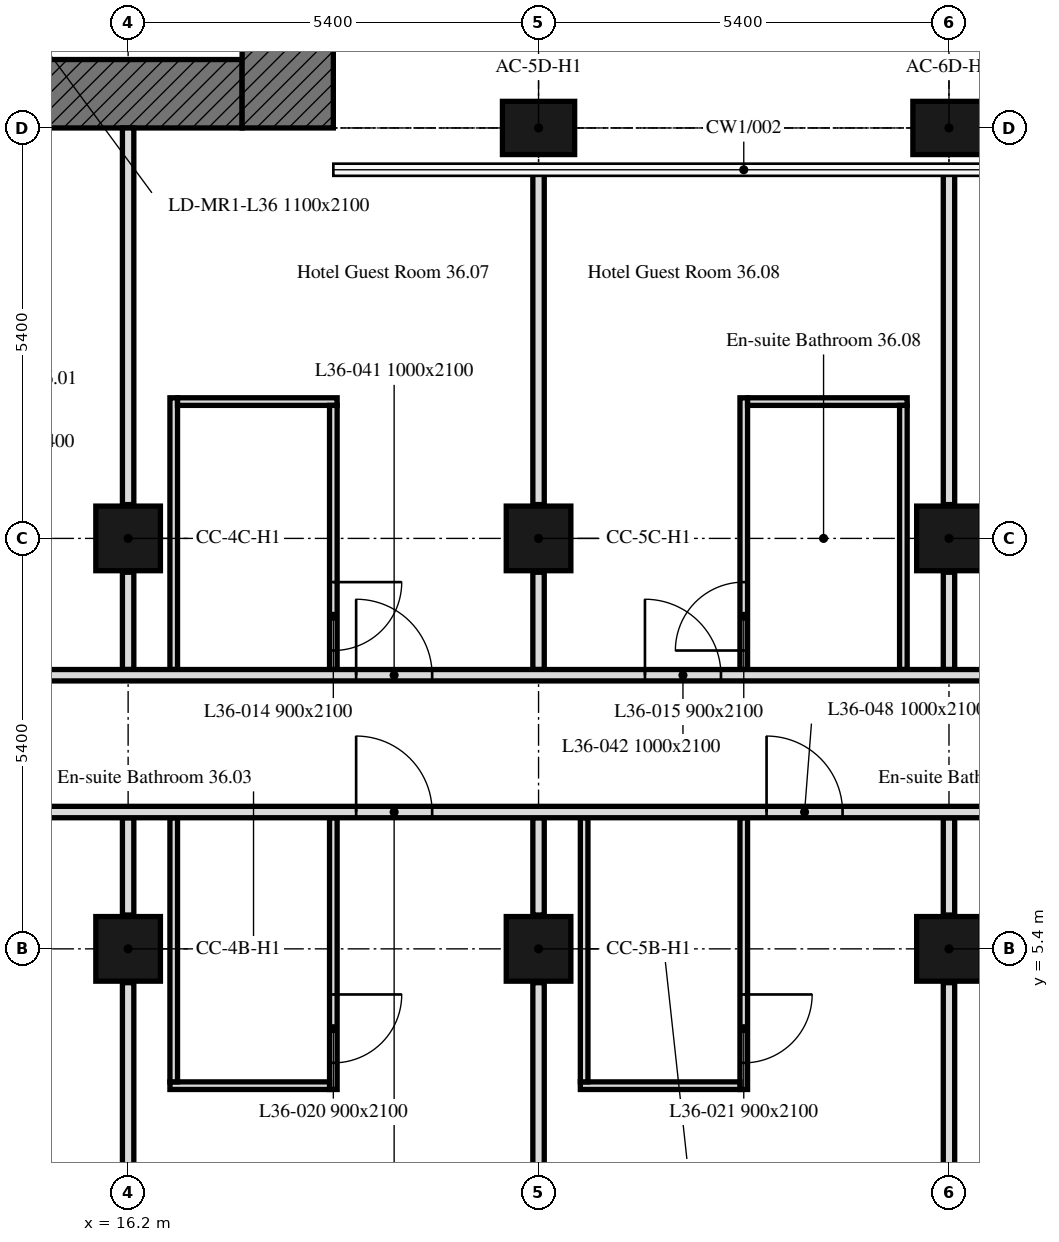
"""IFC4 building model, lengths in metres.
Left out: names, types, materials, properties, quantities, classifications, styles, units other than length and angle.
Written with IfcOpenShell. Run it as: python <this file> out.ifc"""

import sys

from ifc_helpers import new_model, si_unit, direction, frame, frame_2d, origin, origin_2d, place, context, subcontext, project, spatial, rectangle, extrude, element, fill, save


model = new_model("IFC4")
c1 = context("Model", 3, precision=1e-05, world=origin(), true_north=direction((0.0, 1.0)))
c2 = subcontext(c1, "Body", "Model", "MODEL_VIEW")
j1 = project(units=[si_unit("LENGTHUNIT", "METRE"), si_unit("PLANEANGLEUNIT", "RADIAN")], contexts=[c1])
p1 = place(None, origin())
s1 = spatial("IfcSite", under=j1, at=p1, CompositionType="ELEMENT")
p2 = place(p1, origin())
s2 = spatial("IfcBuilding", under=s1, at=p2, CompositionType="ELEMENT")
p3 = place(p2, frame((0.0, 0.0, 156.1)))
s3 = spatial("IfcBuildingStorey", under=s2, at=p3, CompositionType="ELEMENT", Elevation=156.1)
for number, where, z_axis, x_axis in (
    (1, (16.2, 5.4, 0.0), (0.0, 0.0, 1.0), (1.0, 0.0, 0.0)),
    (2, (21.6, 5.4, 0.0), (0.0, 0.0, 1.0), (1.0, 0.0, 0.0)),
    (3, (27.0, 5.4, 0.0), (0.0, 0.0, 1.0), (1.0, 0.0, 0.0)),
    (4, (16.2, 10.8, 0.0), (0.0, 0.0, 1.0), (1.0, 0.0, 0.0)),
    (5, (21.6, 10.8, 0.0), (0.0, 0.0, 1.0), (1.0, 0.0, 0.0)),
    (6, (27.0, 10.8, 0.0), (0.0, 0.0, 1.0), (1.0, 0.0, 0.0)),
):
    element("IfcColumn", number, at=place(p3, frame(where, z_axis=z_axis, x_axis=x_axis)), inside=s3, PredefinedType="COLUMN", context=c2, shape_type="SweptSolid", body=[
        extrude(rectangle(XDim=0.85, YDim=0.85, at=origin_2d()), origin(), (0.0, 0.0, 1.0), 3.0),
    ])
for number, where, z_axis, x_axis in (
    (7, (21.6, 16.2, 0.0), (0.0, 0.0, 1.0), (1.0, 0.0, 0.0)),
    (8, (27.0, 16.2, 0.0), (0.0, 0.0, 1.0), (1.0, 0.0, 0.0)),
):
    element("IfcColumn", number, at=place(p3, frame(where, z_axis=z_axis, x_axis=x_axis)), inside=s3, PredefinedType="COLUMN", context=c2, shape_type="SweptSolid", body=[
        extrude(rectangle(XDim=0.95, YDim=0.7, at=origin_2d()), origin(), (0.0, 0.0, 1.0), 3.0),
    ])
p4 = place(p3, frame((17.7, 16.65, 0.0), z_axis=(0.0, 0.0, 1.0), x_axis=(-1.0, 0.0, 0.0)))
e9 = element("IfcWall", 9, at=p4, inside=s3, PredefinedType="SOLIDWALL", context=c2, shape_type="SweptSolid", body=[
    extrude(rectangle(XDim=11.1, YDim=0.9, at=frame_2d((5.55, 0.0))), origin(), (0.0, 0.0, 1.0), 3.0),
])
p5 = place(p4, frame((5.55, 0.0, 0.0)))
e10 = element("IfcOpeningElement", 10, at=p5, cuts=e9, PredefinedType="OPENING", context=c2, shape_type="SweptSolid", body=[
    extrude(rectangle(XDim=2.0, YDim=2.4, at=frame_2d((1.0, 1.2))), frame((0.0, 0.45, 0.0), z_axis=(0.0, -1.0, 0.0), x_axis=(1.0, 0.0, 0.0)), (0.0, 0.0, 1.0), 0.9),
])
p6 = place(p3, frame((18.3, 32.4, 0.0), z_axis=(0.0, 0.0, 1.0), x_axis=(0.0, -1.0, 0.0)))
e11 = element("IfcWall", 11, at=p6, inside=s3, PredefinedType="SOLIDWALL", context=c2, shape_type="SweptSolid", body=[
    extrude(rectangle(XDim=16.2, YDim=1.2, at=frame_2d((8.1, 0.0))), origin(), (0.0, 0.0, 1.0), 3.0),
])
p7 = place(p3, frame((16.2, 16.2, 0.0), z_axis=(0.0, 0.0, 1.0), x_axis=(0.0, -1.0, 0.0)))
e12 = element("IfcWall", 12, at=p7, inside=s3, PredefinedType="PARTITIONING", context=c2, shape_type="SweptSolid", body=[
    extrude(rectangle(XDim=4.955, YDim=0.15, at=frame_2d((2.478, 0.0))), origin(), (0.0, 0.0, 1.0), 2.4),
])
p8 = place(p3, frame((16.2, 10.355, 0.0), z_axis=(0.0, 0.0, 1.0), x_axis=(0.0, -1.0, 0.0)))
e13 = element("IfcWall", 13, at=p8, inside=s3, PredefinedType="PARTITIONING", context=c2, shape_type="SweptSolid", body=[
    extrude(rectangle(XDim=1.28, YDim=0.15, at=frame_2d((0.64, 0.0))), origin(), (0.0, 0.0, 1.0), 2.4),
])
p9 = place(p3, frame((16.8, 9.075, 0.0), z_axis=(0.0, 0.0, 1.0), x_axis=(0.0, 1.0, 0.0)))
e14 = element("IfcWall", 14, at=p9, inside=s3, PredefinedType="PARTITIONING", context=c2, shape_type="SweptSolid", body=[
    extrude(rectangle(XDim=3.575, YDim=0.1, at=frame_2d((1.788, 0.0))), origin(), (0.0, 0.0, 1.0), 3.0),
])
p10 = place(p3, frame((16.85, 12.6, 0.0), z_axis=(0.0, 0.0, 1.0), x_axis=(1.0, 0.0, 0.0)))
e15 = element("IfcWall", 15, at=p10, inside=s3, PredefinedType="PARTITIONING", context=c2, shape_type="SweptSolid", body=[
    extrude(rectangle(XDim=2.1, YDim=0.1, at=frame_2d((1.05, 0.0))), origin(), (0.0, 0.0, 1.0), 3.0),
])
p11 = place(p3, frame((18.9, 12.55, 0.0), z_axis=(0.0, 0.0, 1.0), x_axis=(0.0, -1.0, 0.0)))
e16 = element("IfcWall", 16, at=p11, inside=s3, PredefinedType="PARTITIONING", context=c2, shape_type="SweptSolid", body=[
    extrude(rectangle(XDim=3.475, YDim=0.1, at=frame_2d((1.738, 0.0))), origin(), (0.0, 0.0, 1.0), 3.0),
])
p12 = place(p11, frame((2.325, 0.0, 0.0)))
e17 = element("IfcOpeningElement", 17, at=p12, cuts=e16, PredefinedType="OPENING", context=c2, shape_type="SweptSolid", body=[
    extrude(rectangle(XDim=0.9, YDim=2.1, at=frame_2d((0.45, 1.05))), frame((0.0, 0.05, 0.0), z_axis=(0.0, -1.0, 0.0), x_axis=(1.0, 0.0, 0.0)), (0.0, 0.0, 1.0), 0.1),
])
p13 = place(p3, frame((21.6, 9.075, 0.0), z_axis=(0.0, 0.0, 1.0), x_axis=(0.0, 1.0, 0.0)))
e18 = element("IfcWall", 18, at=p13, inside=s3, PredefinedType="PARTITIONING", context=c2, shape_type="SweptSolid", body=[
    extrude(rectangle(XDim=1.28, YDim=0.15, at=frame_2d((0.64, 0.0))), origin(), (0.0, 0.0, 1.0), 2.4),
])
p14 = place(p3, frame((21.6, 11.245, 0.0), z_axis=(0.0, 0.0, 1.0), x_axis=(0.0, 1.0, 0.0)))
e19 = element("IfcWall", 19, at=p14, inside=s3, PredefinedType="PARTITIONING", context=c2, shape_type="SweptSolid", body=[
    extrude(rectangle(XDim=4.46, YDim=0.15, at=frame_2d((2.23, 0.0))), origin(), (0.0, 0.0, 1.0), 2.4),
])
p15 = place(p3, frame((24.3, 9.075, 0.0), z_axis=(0.0, 0.0, 1.0), x_axis=(0.0, 1.0, 0.0)))
e20 = element("IfcWall", 20, at=p15, inside=s3, PredefinedType="PARTITIONING", context=c2, shape_type="SweptSolid", body=[
    extrude(rectangle(XDim=3.575, YDim=0.1, at=frame_2d((1.788, 0.0))), origin(), (0.0, 0.0, 1.0), 3.0),
])
p16 = place(p15, frame((0.25, 0.0, 0.0)))
e21 = element("IfcOpeningElement", 21, at=p16, cuts=e20, PredefinedType="OPENING", context=c2, shape_type="SweptSolid", body=[
    extrude(rectangle(XDim=0.9, YDim=2.1, at=frame_2d((0.45, 1.05))), frame((0.0, 0.05, 0.0), z_axis=(0.0, -1.0, 0.0), x_axis=(1.0, 0.0, 0.0)), (0.0, 0.0, 1.0), 0.1),
])
p17 = place(p3, frame((24.35, 12.6, 0.0), z_axis=(0.0, 0.0, 1.0), x_axis=(1.0, 0.0, 0.0)))
e22 = element("IfcWall", 22, at=p17, inside=s3, PredefinedType="PARTITIONING", context=c2, shape_type="SweptSolid", body=[
    extrude(rectangle(XDim=2.1, YDim=0.1, at=frame_2d((1.05, 0.0))), origin(), (0.0, 0.0, 1.0), 3.0),
])
p18 = place(p3, frame((26.4, 12.55, 0.0), z_axis=(0.0, 0.0, 1.0), x_axis=(0.0, -1.0, 0.0)))
e23 = element("IfcWall", 23, at=p18, inside=s3, PredefinedType="PARTITIONING", context=c2, shape_type="SweptSolid", body=[
    extrude(rectangle(XDim=3.475, YDim=0.1, at=frame_2d((1.738, 0.0))), origin(), (0.0, 0.0, 1.0), 3.0),
])
p19 = place(p3, frame((27.0, 9.075, 0.0), z_axis=(0.0, 0.0, 1.0), x_axis=(0.0, 1.0, 0.0)))
e24 = element("IfcWall", 24, at=p19, inside=s3, PredefinedType="PARTITIONING", context=c2, shape_type="SweptSolid", body=[
    extrude(rectangle(XDim=1.28, YDim=0.15, at=frame_2d((0.64, 0.0))), origin(), (0.0, 0.0, 1.0), 2.4),
])
p20 = place(p3, frame((27.0, 11.245, 0.0), z_axis=(0.0, 0.0, 1.0), x_axis=(0.0, 1.0, 0.0)))
e25 = element("IfcWall", 25, at=p20, inside=s3, PredefinedType="PARTITIONING", context=c2, shape_type="SweptSolid", body=[
    extrude(rectangle(XDim=4.46, YDim=0.15, at=frame_2d((2.23, 0.0))), origin(), (0.0, 0.0, 1.0), 2.4),
])
p21 = place(p3, frame((16.2, 0.751, 0.0), z_axis=(0.0, 0.0, 1.0), x_axis=(0.0, 1.0, 0.0)))
e26 = element("IfcWall", 26, at=p21, inside=s3, PredefinedType="PARTITIONING", context=c2, shape_type="SweptSolid", body=[
    extrude(rectangle(XDim=4.204, YDim=0.15, at=frame_2d((2.102, 0.0))), origin(), (0.0, 0.0, 1.0), 2.4),
])
p22 = place(p3, frame((16.2, 5.845, 0.0), z_axis=(0.0, 0.0, 1.0), x_axis=(0.0, 1.0, 0.0)))
e27 = element("IfcWall", 27, at=p22, inside=s3, PredefinedType="PARTITIONING", context=c2, shape_type="SweptSolid", body=[
    extrude(rectangle(XDim=1.28, YDim=0.15, at=frame_2d((0.64, 0.0))), origin(), (0.0, 0.0, 1.0), 2.4),
])
p23 = place(p3, frame((21.6, 0.751, 0.0), z_axis=(0.0, 0.0, 1.0), x_axis=(0.0, 1.0, 0.0)))
e28 = element("IfcWall", 28, at=p23, inside=s3, PredefinedType="PARTITIONING", context=c2, shape_type="SweptSolid", body=[
    extrude(rectangle(XDim=4.204, YDim=0.15, at=frame_2d((2.102, 0.0))), origin(), (0.0, 0.0, 1.0), 2.4),
])
p24 = place(p3, frame((21.6, 5.845, 0.0), z_axis=(0.0, 0.0, 1.0), x_axis=(0.0, 1.0, 0.0)))
e29 = element("IfcWall", 29, at=p24, inside=s3, PredefinedType="PARTITIONING", context=c2, shape_type="SweptSolid", body=[
    extrude(rectangle(XDim=1.28, YDim=0.15, at=frame_2d((0.64, 0.0))), origin(), (0.0, 0.0, 1.0), 2.4),
])
p25 = place(p3, frame((18.9, 7.125, 0.0), z_axis=(0.0, 0.0, 1.0), x_axis=(0.0, -1.0, 0.0)))
e30 = element("IfcWall", 30, at=p25, inside=s3, PredefinedType="PARTITIONING", context=c2, shape_type="SweptSolid", body=[
    extrude(rectangle(XDim=3.575, YDim=0.1, at=frame_2d((1.788, 0.0))), origin(), (0.0, 0.0, 1.0), 3.0),
])
p26 = place(p25, frame((2.325, 0.0, 0.0)))
e31 = element("IfcOpeningElement", 31, at=p26, cuts=e30, PredefinedType="OPENING", context=c2, shape_type="SweptSolid", body=[
    extrude(rectangle(XDim=0.9, YDim=2.1, at=frame_2d((0.45, 1.05))), frame((0.0, 0.05, 0.0), z_axis=(0.0, -1.0, 0.0), x_axis=(1.0, 0.0, 0.0)), (0.0, 0.0, 1.0), 0.1),
])
p27 = place(p3, frame((18.85, 3.6, 0.0), z_axis=(0.0, 0.0, 1.0), x_axis=(-1.0, 0.0, 0.0)))
e32 = element("IfcWall", 32, at=p27, inside=s3, PredefinedType="PARTITIONING", context=c2, shape_type="SweptSolid", body=[
    extrude(rectangle(XDim=2.1, YDim=0.1, at=frame_2d((1.05, 0.0))), origin(), (0.0, 0.0, 1.0), 3.0),
])
p28 = place(p3, frame((16.8, 3.65, 0.0), z_axis=(0.0, 0.0, 1.0), x_axis=(0.0, 1.0, 0.0)))
e33 = element("IfcWall", 33, at=p28, inside=s3, PredefinedType="PARTITIONING", context=c2, shape_type="SweptSolid", body=[
    extrude(rectangle(XDim=3.475, YDim=0.1, at=frame_2d((1.738, 0.0))), origin(), (0.0, 0.0, 1.0), 3.0),
])
p29 = place(p3, frame((27.0, 0.751, 0.0), z_axis=(0.0, 0.0, 1.0), x_axis=(0.0, 1.0, 0.0)))
e34 = element("IfcWall", 34, at=p29, inside=s3, PredefinedType="PARTITIONING", context=c2, shape_type="SweptSolid", body=[
    extrude(rectangle(XDim=4.204, YDim=0.15, at=frame_2d((2.102, 0.0))), origin(), (0.0, 0.0, 1.0), 2.4),
])
p30 = place(p3, frame((27.0, 5.845, 0.0), z_axis=(0.0, 0.0, 1.0), x_axis=(0.0, 1.0, 0.0)))
e35 = element("IfcWall", 35, at=p30, inside=s3, PredefinedType="PARTITIONING", context=c2, shape_type="SweptSolid", body=[
    extrude(rectangle(XDim=1.28, YDim=0.15, at=frame_2d((0.64, 0.0))), origin(), (0.0, 0.0, 1.0), 2.4),
])
p31 = place(p3, frame((24.3, 7.125, 0.0), z_axis=(0.0, 0.0, 1.0), x_axis=(0.0, -1.0, 0.0)))
e36 = element("IfcWall", 36, at=p31, inside=s3, PredefinedType="PARTITIONING", context=c2, shape_type="SweptSolid", body=[
    extrude(rectangle(XDim=3.575, YDim=0.1, at=frame_2d((1.788, 0.0))), origin(), (0.0, 0.0, 1.0), 3.0),
])
p32 = place(p31, frame((2.325, 0.0, 0.0)))
e37 = element("IfcOpeningElement", 37, at=p32, cuts=e36, PredefinedType="OPENING", context=c2, shape_type="SweptSolid", body=[
    extrude(rectangle(XDim=0.9, YDim=2.1, at=frame_2d((0.45, 1.05))), frame((0.0, 0.05, 0.0), z_axis=(0.0, -1.0, 0.0), x_axis=(1.0, 0.0, 0.0)), (0.0, 0.0, 1.0), 0.1),
])
p33 = place(p3, frame((24.25, 3.6, 0.0), z_axis=(0.0, 0.0, 1.0), x_axis=(-1.0, 0.0, 0.0)))
e38 = element("IfcWall", 38, at=p33, inside=s3, PredefinedType="PARTITIONING", context=c2, shape_type="SweptSolid", body=[
    extrude(rectangle(XDim=2.1, YDim=0.1, at=frame_2d((1.05, 0.0))), origin(), (0.0, 0.0, 1.0), 3.0),
])
p34 = place(p3, frame((22.2, 3.65, 0.0), z_axis=(0.0, 0.0, 1.0), x_axis=(0.0, 1.0, 0.0)))
e39 = element("IfcWall", 39, at=p34, inside=s3, PredefinedType="PARTITIONING", context=c2, shape_type="SweptSolid", body=[
    extrude(rectangle(XDim=3.475, YDim=0.1, at=frame_2d((1.738, 0.0))), origin(), (0.0, 0.0, 1.0), 3.0),
])
p35 = place(p3, frame((6.151, 7.2, 0.0), z_axis=(0.0, 0.0, 1.0), x_axis=(1.0, 0.0, 0.0)))
e40 = element("IfcWall", 40, at=p35, inside=s3, PredefinedType="PARTITIONING", context=c2, shape_type="SweptSolid", body=[
    extrude(rectangle(XDim=41.698, YDim=0.15, at=frame_2d((20.849, 0.0))), origin(), (0.0, 0.0, 1.0), 2.4),
])
p36 = place(p35, frame((2.249, 0.0, 0.0)))
e41 = element("IfcOpeningElement", 41, at=p36, cuts=e40, PredefinedType="OPENING", context=c2, shape_type="SweptSolid", body=[
    extrude(rectangle(XDim=1.0, YDim=2.1, at=frame_2d((0.5, 1.05))), frame((0.0, 0.075, 0.0), z_axis=(0.0, -1.0, 0.0), x_axis=(1.0, 0.0, 0.0)), (0.0, 0.0, 1.0), 0.15),
])
p37 = place(p35, frame((7.649, 0.0, 0.0)))
e42 = element("IfcOpeningElement", 42, at=p37, cuts=e40, PredefinedType="OPENING", context=c2, shape_type="SweptSolid", body=[
    extrude(rectangle(XDim=1.0, YDim=2.1, at=frame_2d((0.5, 1.05))), frame((0.0, 0.075, 0.0), z_axis=(0.0, -1.0, 0.0), x_axis=(1.0, 0.0, 0.0)), (0.0, 0.0, 1.0), 0.15),
])
p38 = place(p35, frame((13.049, 0.0, 0.0)))
e43 = element("IfcOpeningElement", 43, at=p38, cuts=e40, PredefinedType="OPENING", context=c2, shape_type="SweptSolid", body=[
    extrude(rectangle(XDim=1.0, YDim=2.1, at=frame_2d((0.5, 1.05))), frame((0.0, 0.075, 0.0), z_axis=(0.0, -1.0, 0.0), x_axis=(1.0, 0.0, 0.0)), (0.0, 0.0, 1.0), 0.15),
])
p39 = place(p35, frame((18.449, 0.0, 0.0)))
e44 = element("IfcOpeningElement", 44, at=p39, cuts=e40, PredefinedType="OPENING", context=c2, shape_type="SweptSolid", body=[
    extrude(rectangle(XDim=1.0, YDim=2.1, at=frame_2d((0.5, 1.05))), frame((0.0, 0.075, 0.0), z_axis=(0.0, -1.0, 0.0), x_axis=(1.0, 0.0, 0.0)), (0.0, 0.0, 1.0), 0.15),
])
p40 = place(p35, frame((23.849, 0.0, 0.0)))
e45 = element("IfcOpeningElement", 45, at=p40, cuts=e40, PredefinedType="OPENING", context=c2, shape_type="SweptSolid", body=[
    extrude(rectangle(XDim=1.0, YDim=2.1, at=frame_2d((0.5, 1.05))), frame((0.0, 0.075, 0.0), z_axis=(0.0, -1.0, 0.0), x_axis=(1.0, 0.0, 0.0)), (0.0, 0.0, 1.0), 0.15),
])
p41 = place(p35, frame((29.249, 0.0, 0.0)))
e46 = element("IfcOpeningElement", 46, at=p41, cuts=e40, PredefinedType="OPENING", context=c2, shape_type="SweptSolid", body=[
    extrude(rectangle(XDim=1.0, YDim=2.1, at=frame_2d((0.5, 1.05))), frame((0.0, 0.075, 0.0), z_axis=(0.0, -1.0, 0.0), x_axis=(1.0, 0.0, 0.0)), (0.0, 0.0, 1.0), 0.15),
])
p42 = place(p35, frame((37.599, 0.0, 0.0)))
e47 = element("IfcOpeningElement", 47, at=p42, cuts=e40, PredefinedType="OPENING", context=c2, shape_type="SweptSolid", body=[
    extrude(rectangle(XDim=1.0, YDim=2.1, at=frame_2d((0.5, 1.05))), frame((0.0, 0.075, 0.0), z_axis=(0.0, -1.0, 0.0), x_axis=(1.0, 0.0, 0.0)), (0.0, 0.0, 1.0), 0.15),
])
p43 = place(p3, frame((6.151, 9.0, 0.0), z_axis=(0.0, 0.0, 1.0), x_axis=(1.0, 0.0, 0.0)))
e48 = element("IfcWall", 48, at=p43, inside=s3, PredefinedType="PARTITIONING", context=c2, shape_type="SweptSolid", body=[
    extrude(rectangle(XDim=36.974, YDim=0.15, at=frame_2d((18.487, 0.0))), origin(), (0.0, 0.0, 1.0), 2.4),
])
p44 = place(p43, frame((1.214, 0.0, 0.0)))
e49 = element("IfcOpeningElement", 49, at=p44, cuts=e48, PredefinedType="OPENING", context=c2, shape_type="SweptSolid", body=[
    extrude(rectangle(XDim=1.0, YDim=2.1, at=frame_2d((0.5, 1.05))), frame((0.0, 0.075, 0.0), z_axis=(0.0, -1.0, 0.0), x_axis=(1.0, 0.0, 0.0)), (0.0, 0.0, 1.0), 0.15),
])
p45 = place(p43, frame((28.199, 0.0, 0.0)))
e50 = element("IfcOpeningElement", 50, at=p45, cuts=e48, PredefinedType="OPENING", context=c2, shape_type="SweptSolid", body=[
    extrude(rectangle(XDim=1.0, YDim=2.1, at=frame_2d((0.5, 1.05))), frame((0.0, 0.075, 0.0), z_axis=(0.0, -1.0, 0.0), x_axis=(1.0, 0.0, 0.0)), (0.0, 0.0, 1.0), 0.15),
])
p46 = place(p43, frame((7.099, 0.0, 0.0)))
e51 = element("IfcOpeningElement", 51, at=p46, cuts=e48, PredefinedType="OPENING", context=c2, shape_type="SweptSolid", body=[
    extrude(rectangle(XDim=1.0, YDim=2.1, at=frame_2d((0.5, 1.05))), frame((0.0, 0.075, 0.0), z_axis=(0.0, -1.0, 0.0), x_axis=(1.0, 0.0, 0.0)), (0.0, 0.0, 1.0), 0.15),
])
p47 = place(p43, frame((13.049, 0.0, 0.0)))
e52 = element("IfcOpeningElement", 52, at=p47, cuts=e48, PredefinedType="OPENING", context=c2, shape_type="SweptSolid", body=[
    extrude(rectangle(XDim=1.0, YDim=2.1, at=frame_2d((0.5, 1.05))), frame((0.0, 0.075, 0.0), z_axis=(0.0, -1.0, 0.0), x_axis=(1.0, 0.0, 0.0)), (0.0, 0.0, 1.0), 0.15),
])
p48 = place(p43, frame((16.849, 0.0, 0.0)))
e53 = element("IfcOpeningElement", 53, at=p48, cuts=e48, PredefinedType="OPENING", context=c2, shape_type="SweptSolid", body=[
    extrude(rectangle(XDim=1.0, YDim=2.1, at=frame_2d((0.5, 1.05))), frame((0.0, 0.075, 0.0), z_axis=(0.0, -1.0, 0.0), x_axis=(1.0, 0.0, 0.0)), (0.0, 0.0, 1.0), 0.15),
])
p49 = place(p43, frame((23.849, 0.0, 0.0)))
e54 = element("IfcOpeningElement", 54, at=p49, cuts=e48, PredefinedType="OPENING", context=c2, shape_type="SweptSolid", body=[
    extrude(rectangle(XDim=1.0, YDim=2.1, at=frame_2d((0.5, 1.05))), frame((0.0, 0.075, 0.0), z_axis=(0.0, -1.0, 0.0), x_axis=(1.0, 0.0, 0.0)), (0.0, 0.0, 1.0), 0.15),
])
p50 = place(p43, frame((4.829, 0.0, 0.0)))
e55 = element("IfcOpeningElement", 55, at=p50, cuts=e48, PredefinedType="OPENING", context=c2, shape_type="SweptSolid", body=[
    extrude(rectangle(XDim=1.8, YDim=2.4, at=frame_2d((0.9, 1.2))), frame((0.0, 0.075, 0.0), z_axis=(0.0, -1.0, 0.0), x_axis=(1.0, 0.0, 0.0)), (0.0, 0.0, 1.0), 0.15),
])
p51 = place(p43, frame((30.199, 0.0, 0.0)))
e56 = element("IfcOpeningElement", 56, at=p51, cuts=e48, PredefinedType="OPENING", context=c2, shape_type="SweptSolid", body=[
    extrude(rectangle(XDim=1.0, YDim=2.1, at=frame_2d((0.5, 1.05))), frame((0.0, 0.075, 0.0), z_axis=(0.0, -1.0, 0.0), x_axis=(1.0, 0.0, 0.0)), (0.0, 0.0, 1.0), 0.15),
])
p52 = place(p12, origin())
e57 = element("IfcDoor", 57, at=p52, inside=s3, OperationType="SINGLE_SWING_RIGHT", PredefinedType="DOOR", context=c2, shape_type="SweptSolid", body=[
    extrude(rectangle(XDim=0.9, YDim=2.1, at=frame_2d((0.45, 1.05))), frame((0.0, 0.025, 0.0), z_axis=(0.0, -1.0, 0.0), x_axis=(1.0, 0.0, 0.0)), (0.0, 0.0, 1.0), 0.05),
])
fill(e17, e57)
p53 = place(p16, origin())
e58 = element("IfcDoor", 58, at=p53, inside=s3, OperationType="SINGLE_SWING_RIGHT", PredefinedType="DOOR", context=c2, shape_type="SweptSolid", body=[
    extrude(rectangle(XDim=0.9, YDim=2.1, at=frame_2d((0.45, 1.05))), frame((0.0, 0.025, 0.0), z_axis=(0.0, -1.0, 0.0), x_axis=(1.0, 0.0, 0.0)), (0.0, 0.0, 1.0), 0.05),
])
fill(e21, e58)
p54 = place(p26, origin())
e59 = element("IfcDoor", 59, at=p54, inside=s3, OperationType="SINGLE_SWING_LEFT", PredefinedType="DOOR", context=c2, shape_type="SweptSolid", body=[
    extrude(rectangle(XDim=0.9, YDim=2.1, at=frame_2d((0.45, 1.05))), frame((0.0, 0.025, 0.0), z_axis=(0.0, -1.0, 0.0), x_axis=(1.0, 0.0, 0.0)), (0.0, 0.0, 1.0), 0.05),
])
fill(e31, e59)
p55 = place(p32, origin())
e60 = element("IfcDoor", 60, at=p55, inside=s3, OperationType="SINGLE_SWING_LEFT", PredefinedType="DOOR", context=c2, shape_type="SweptSolid", body=[
    extrude(rectangle(XDim=0.9, YDim=2.1, at=frame_2d((0.45, 1.05))), frame((0.0, 0.025, 0.0), z_axis=(0.0, -1.0, 0.0), x_axis=(1.0, 0.0, 0.0)), (0.0, 0.0, 1.0), 0.05),
])
fill(e37, e60)
p56 = place(p47, origin())
e61 = element("IfcDoor", 61, at=p56, inside=s3, OperationType="SINGLE_SWING_RIGHT", PredefinedType="DOOR", context=c2, shape_type="SweptSolid", body=[
    extrude(rectangle(XDim=1.0, YDim=2.1, at=frame_2d((0.5, 1.05))), frame((0.0, 0.025, 0.0), z_axis=(0.0, -1.0, 0.0), x_axis=(1.0, 0.0, 0.0)), (0.0, 0.0, 1.0), 0.05),
])
fill(e52, e61)
p57 = place(p48, origin())
e62 = element("IfcDoor", 62, at=p57, inside=s3, OperationType="SINGLE_SWING_LEFT", PredefinedType="DOOR", context=c2, shape_type="SweptSolid", body=[
    extrude(rectangle(XDim=1.0, YDim=2.1, at=frame_2d((0.5, 1.05))), frame((0.0, 0.025, 0.0), z_axis=(0.0, -1.0, 0.0), x_axis=(1.0, 0.0, 0.0)), (0.0, 0.0, 1.0), 0.05),
])
fill(e53, e62)
p58 = place(p38, origin())
e63 = element("IfcDoor", 63, at=p58, inside=s3, OperationType="SINGLE_SWING_LEFT", PredefinedType="DOOR", context=c2, shape_type="SweptSolid", body=[
    extrude(rectangle(XDim=1.0, YDim=2.1, at=frame_2d((0.5, 1.05))), frame((0.0, 0.025, 0.0), z_axis=(0.0, -1.0, 0.0), x_axis=(1.0, 0.0, 0.0)), (0.0, 0.0, 1.0), 0.05),
])
fill(e43, e63)
p59 = place(p39, origin())
e64 = element("IfcDoor", 64, at=p59, inside=s3, OperationType="SINGLE_SWING_RIGHT", PredefinedType="DOOR", context=c2, shape_type="SweptSolid", body=[
    extrude(rectangle(XDim=1.0, YDim=2.1, at=frame_2d((0.5, 1.05))), frame((0.0, 0.025, 0.0), z_axis=(0.0, -1.0, 0.0), x_axis=(1.0, 0.0, 0.0)), (0.0, 0.0, 1.0), 0.05),
])
fill(e44, e64)
save(model, sys.argv[1])
